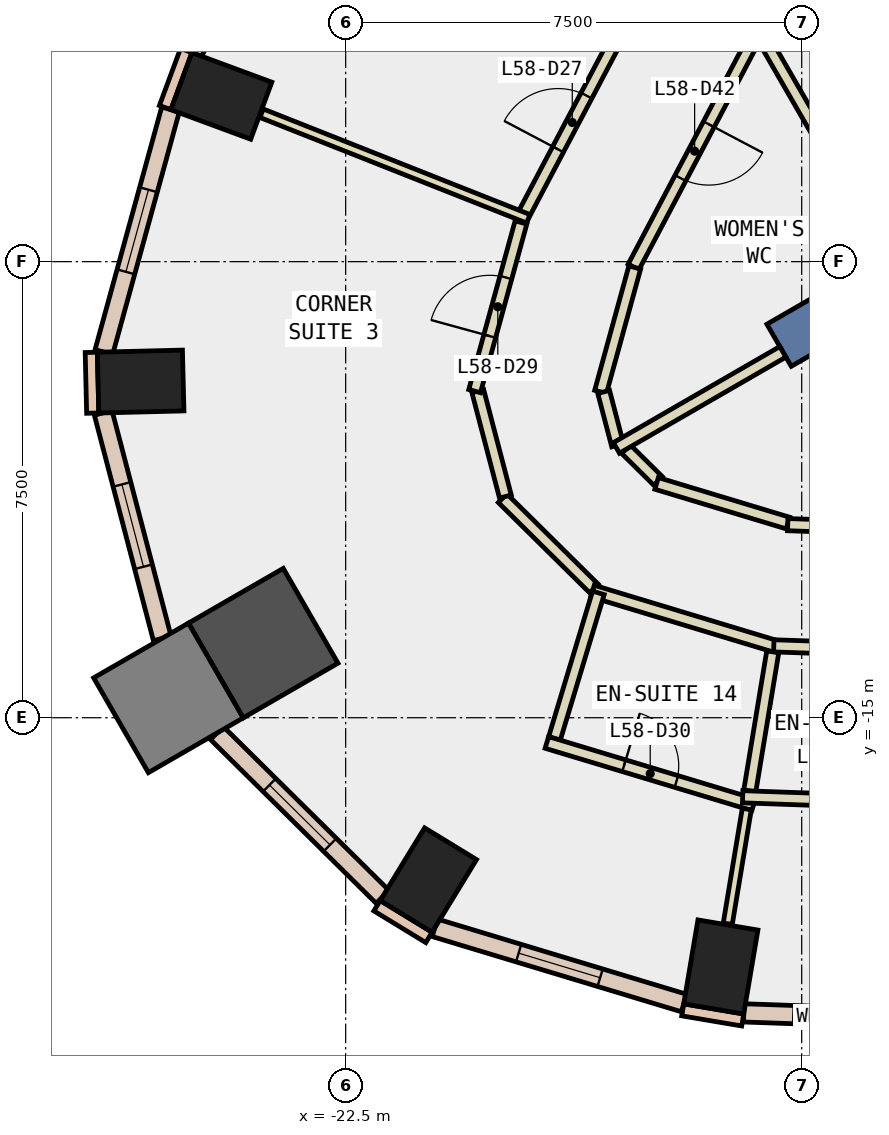
"""IFC4 building model, lengths in metres.
Left out: names, types, materials, properties, quantities, classifications, styles, units other than length and angle.
Written with IfcOpenShell. Run it as: python <this file> out.ifc"""

import sys

from ifc_helpers import new_model, si_unit, direction, frame, frame_2d, origin, origin_2d, place, context, subcontext, project, spatial, rectangle, extrude, element, fill, save


model = new_model("IFC4")
c1 = context("Model", 3, precision=1e-05, world=origin(), true_north=direction((0.0, 1.0)))
c2 = subcontext(c1, "Body", "Model", "MODEL_VIEW")
j1 = project(units=[si_unit("LENGTHUNIT", "METRE"), si_unit("PLANEANGLEUNIT", "RADIAN")], contexts=[c1])
p1 = place(None, origin())
s1 = spatial("IfcSite", under=j1, at=p1, CompositionType="ELEMENT")
p2 = place(p1, origin())
s2 = spatial("IfcBuilding", under=s1, at=p2, CompositionType="ELEMENT")
p3 = place(p2, frame((0.0, 0.0, 255.8)))
s3 = spatial("IfcBuildingStorey", under=s2, at=p3, CompositionType="ELEMENT", Elevation=255.8)
for number, where, z_axis, x_axis in (
    (1, (-16.33, -19.099, -0.34), (0.0, 0.0, 1.0), (-0.986, 0.167, 0.0)),
    (2, (-24.545, -4.775, -0.34), (0.0, 0.0, 1.0), (0.347, 0.938, 0.0)),
    (3, (-25.872, -9.472, -0.34), (0.0, 0.0, 1.0), (-0.025, 1.0, 0.0)),
):
    element("IfcColumn", number, at=place(p3, frame(where, z_axis=z_axis, x_axis=x_axis)), inside=s3, PredefinedType="COLUMN", context=c2, shape_type="SweptSolid", body=[
        extrude(rectangle(XDim=1.0, YDim=1.4, at=origin_2d()), origin(), (0.0, 0.0, 1.0), 3.6),
    ])
p4 = place(p3, frame((-23.856, -13.774, -0.34), z_axis=(0.0, 0.0, 1.0), x_axis=(0.866025403784, 0.5, 0.0)))
e4 = element("IfcColumn", 4, at=p4, inside=s3, PredefinedType="COLUMN", context=c2, shape_type="SweptSolid", body=[
    extrude(rectangle(XDim=1.8, YDim=1.8, at=origin_2d()), origin(), (0.0, 0.0, 1.0), 3.6),
])
p5 = place(p3, frame((-21.14, -17.67, -0.34), z_axis=(0.0, 0.0, 1.0), x_axis=(-0.853341581839, 0.521352227103, 0.0)))
e5 = element("IfcColumn", 5, at=p5, inside=s3, PredefinedType="COLUMN", context=c2, shape_type="SweptSolid", body=[
    extrude(rectangle(XDim=1.0, YDim=1.4, at=origin_2d()), origin(), (0.0, 0.0, 1.0), 3.6),
])
p6 = place(p3, frame((-25.415, -14.674, -0.34), z_axis=(0.0, 0.0, 1.0), x_axis=(0.866025403784, 0.5, 0.0)))
e6 = element("IfcColumn", 6, at=p6, inside=s3, PredefinedType="COLUMN", context=c2, shape_type="SweptSolid", body=[
    extrude(rectangle(XDim=1.8, YDim=1.8, at=origin_2d()), origin(), (0.0, 0.0, 1.0), 3.6),
])
p7 = place(p3, frame((-7.578, -4.375, -0.34), z_axis=(0.0, 0.0, 1.0), x_axis=(-0.866024315419, -0.5000018851, 0.0)))
e7 = element("IfcWall", 7, at=p7, inside=s3, PredefinedType="SHEAR", context=c2, shape_type="SweptSolid", body=[
    extrude(rectangle(XDim=9.0, YDim=0.8, at=frame_2d((4.5, 0.0))), origin(), (0.0, 0.0, 1.0), 3.6),
])
p8 = place(p3, frame((-25.122, -4.029, 0.0), z_axis=(0.0, 0.0, 1.0), x_axis=(-0.346892928577, -0.937904737222, 0.0)))
e8 = element("IfcWall", 8, at=p8, inside=s3, PredefinedType="STANDARD", context=c2, shape_type="SweptSolid", body=[
    extrude(rectangle(XDim=1.0, YDim=0.2, at=frame_2d((0.5, 0.0))), origin(), (0.0, 0.0, 1.0), 3.26),
])
p9 = place(p3, frame((-16.956, -19.804, 0.0), z_axis=(0.0, 0.0, 1.0), x_axis=(0.985961725342, -0.166971483074, 0.0)))
e9 = element("IfcWall", 9, at=p9, inside=s3, PredefinedType="STANDARD", context=c2, shape_type="SweptSolid", body=[
    extrude(rectangle(XDim=1.0, YDim=0.2, at=frame_2d((0.5, 0.0))), origin(), (0.0, 0.0, 1.0), 3.26),
])
p10 = place(p3, frame((-26.684, -8.992, 0.0), z_axis=(0.0, 0.0, 1.0), x_axis=(0.024186470916, -0.999707464524, 0.0)))
e10 = element("IfcWall", 10, at=p10, inside=s3, PredefinedType="STANDARD", context=c2, shape_type="SweptSolid", body=[
    extrude(rectangle(XDim=0.999, YDim=0.2, at=frame_2d((0.5, 0.0))), origin(), (0.0, 0.0, 1.0), 3.26),
])
p11 = place(p3, frame((-21.984, -18.092, 0.0), z_axis=(0.0, 0.0, 1.0), x_axis=(0.853679739553, -0.520798331677, 0.0)))
e11 = element("IfcWall", 11, at=p11, inside=s3, PredefinedType="STANDARD", context=c2, shape_type="SweptSolid", body=[
    extrude(rectangle(XDim=1.0, YDim=0.2, at=frame_2d((0.5, 0.0))), origin(), (0.0, 0.0, 1.0), 3.26),
])
p12 = place(p3, frame((-15.952, -19.854, 0.0), z_axis=(0.0, 0.0, 1.0), x_axis=(0.999387577449, -0.034992428331, 0.0)))
e12 = element("IfcWall", 12, at=p12, inside=s3, PredefinedType="STANDARD", context=c2, shape_type="SweptSolid", body=[
    extrude(rectangle(XDim=7.661, YDim=0.3, at=frame_2d((3.83, 0.0))), origin(), (0.0, 0.0, 1.0), 3.26),
])
p13 = place(p12, frame((0.815, 0.0, 0.9)))
e13 = element("IfcOpeningElement", 13, at=p13, cuts=e12, PredefinedType="OPENING", context=c2, shape_type="SweptSolid", body=[
    extrude(rectangle(XDim=2.2, YDim=2.0, at=frame_2d((1.1, 1.0))), frame((0.0, 0.16, 0.0), z_axis=(0.0, -1.0, 0.0), x_axis=(1.0, 0.0, 0.0)), (0.0, 0.0, 1.0), 0.32),
])
p14 = place(p12, frame((4.646, 0.0, 0.9)))
e14 = element("IfcOpeningElement", 14, at=p14, cuts=e12, PredefinedType="OPENING", context=c2, shape_type="SweptSolid", body=[
    extrude(rectangle(XDim=2.2, YDim=2.0, at=frame_2d((1.1, 1.0))), frame((0.0, 0.16, 0.0), z_axis=(0.0, -1.0, 0.0), x_axis=(1.0, 0.0, 0.0)), (0.0, 0.0, 1.0), 0.32),
])
p15 = place(p3, frame((-22.381, 0.916, 0.0), z_axis=(0.0, 0.0, 1.0), x_axis=(-0.466663589714, -0.884434900959, 0.0)))
e15 = element("IfcWall", 15, at=p15, inside=s3, PredefinedType="STANDARD", context=c2, shape_type="SweptSolid", body=[
    extrude(rectangle(XDim=5.638, YDim=0.3, at=frame_2d((2.819, 0.0))), origin(), (0.0, 0.0, 1.0), 3.26),
])
p16 = place(p15, frame((0.459, 0.0, 0.9)))
e16 = element("IfcOpeningElement", 16, at=p16, cuts=e15, PredefinedType="OPENING", context=c2, shape_type="SweptSolid", body=[
    extrude(rectangle(XDim=1.9, YDim=2.0, at=frame_2d((0.95, 1.0))), frame((0.0, 0.16, 0.0), z_axis=(0.0, -1.0, 0.0), x_axis=(1.0, 0.0, 0.0)), (0.0, 0.0, 1.0), 0.32),
])
p17 = place(p15, frame((3.278, 0.0, 0.9)))
e17 = element("IfcOpeningElement", 17, at=p17, cuts=e15, PredefinedType="OPENING", context=c2, shape_type="SweptSolid", body=[
    extrude(rectangle(XDim=1.9, YDim=2.0, at=frame_2d((0.95, 1.0))), frame((0.0, 0.16, 0.0), z_axis=(0.0, -1.0, 0.0), x_axis=(1.0, 0.0, 0.0)), (0.0, 0.0, 1.0), 0.32),
])
p18 = place(p3, frame((-25.381, -4.998, 0.0), z_axis=(0.0, 0.0, 1.0), x_axis=(-0.264924661919, -0.964269113633, 0.0)))
e18 = element("IfcWall", 18, at=p18, inside=s3, PredefinedType="STANDARD", context=c2, shape_type="SweptSolid", body=[
    extrude(rectangle(XDim=4.137, YDim=0.3, at=frame_2d((2.068, 0.0))), origin(), (0.0, 0.0, 1.0), 3.26),
])
p19 = place(p18, frame((1.368, 0.0, 0.9)))
e19 = element("IfcOpeningElement", 19, at=p19, cuts=e18, PredefinedType="OPENING", context=c2, shape_type="SweptSolid", body=[
    extrude(rectangle(XDim=1.4, YDim=2.0, at=frame_2d((0.7, 1.0))), frame((0.0, 0.16, 0.0), z_axis=(0.0, -1.0, 0.0), x_axis=(1.0, 0.0, 0.0)), (0.0, 0.0, 1.0), 0.32),
])
p20 = place(p3, frame((-26.488, -9.986, 0.0), z_axis=(0.0, 0.0, 1.0), x_axis=(0.253248721632, -0.967401201669, 0.0)))
e20 = element("IfcWall", 20, at=p20, inside=s3, PredefinedType="STANDARD", context=c2, shape_type="SweptSolid", body=[
    extrude(rectangle(XDim=3.834, YDim=0.3, at=frame_2d((1.917, 0.0))), origin(), (0.0, 0.0, 1.0), 3.26),
])
p21 = place(p20, frame((1.217, 0.0, 0.9)))
e21 = element("IfcOpeningElement", 21, at=p21, cuts=e20, PredefinedType="OPENING", context=c2, shape_type="SweptSolid", body=[
    extrude(rectangle(XDim=1.4, YDim=2.0, at=frame_2d((0.7, 1.0))), frame((0.0, 0.16, 0.0), z_axis=(0.0, -1.0, 0.0), x_axis=(1.0, 0.0, 0.0)), (0.0, 0.0, 1.0), 0.32),
])
p22 = place(p3, frame((-24.618, -15.252, 0.0), z_axis=(0.0, 0.0, 1.0), x_axis=(0.71110935557, -0.703081420904, 0.0)))
e22 = element("IfcWall", 22, at=p22, inside=s3, PredefinedType="STANDARD", context=c2, shape_type="SweptSolid", body=[
    extrude(rectangle(XDim=3.832, YDim=0.3, at=frame_2d((1.916, 0.0))), origin(), (0.0, 0.0, 1.0), 3.26),
])
p23 = place(p22, frame((1.216, 0.0, 0.9)))
e23 = element("IfcOpeningElement", 23, at=p23, cuts=e22, PredefinedType="OPENING", context=c2, shape_type="SweptSolid", body=[
    extrude(rectangle(XDim=1.4, YDim=2.0, at=frame_2d((0.7, 1.0))), frame((0.0, 0.16, 0.0), z_axis=(0.0, -1.0, 0.0), x_axis=(1.0, 0.0, 0.0)), (0.0, 0.0, 1.0), 0.32),
])
p24 = place(p3, frame((-21.034, -18.455, 0.0), z_axis=(0.0, 0.0, 1.0), x_axis=(0.957346168713, -0.288943442997, 0.0)))
e24 = element("IfcWall", 24, at=p24, inside=s3, PredefinedType="STANDARD", context=c2, shape_type="SweptSolid", body=[
    extrude(rectangle(XDim=4.281, YDim=0.3, at=frame_2d((2.14, 0.0))), origin(), (0.0, 0.0, 1.0), 3.26),
])
p25 = place(p24, frame((1.44, 0.0, 0.9)))
e25 = element("IfcOpeningElement", 25, at=p25, cuts=e24, PredefinedType="OPENING", context=c2, shape_type="SweptSolid", body=[
    extrude(rectangle(XDim=1.4, YDim=2.0, at=frame_2d((0.7, 1.0))), frame((0.0, 0.16, 0.0), z_axis=(0.0, -1.0, 0.0), x_axis=(1.0, 0.0, 0.0)), (0.0, 0.0, 1.0), 0.32),
])
p26 = place(p3, frame((-15.756, -3.779, 0.0), z_axis=(0.0, 0.0, 1.0), x_axis=(-0.46672043873, -0.884404902786, 0.0)))
e26 = element("IfcWall", 26, at=p26, inside=s3, PredefinedType="PARTITIONING", context=c2, shape_type="SweptSolid", body=[
    extrude(rectangle(XDim=4.307, YDim=0.2, at=frame_2d((2.153, 0.0))), origin(), (0.0, 0.0, 1.0), 3.26),
])
p27 = place(p26, frame((1.653, 0.0, 0.0)))
e27 = element("IfcOpeningElement", 27, at=p27, cuts=e26, PredefinedType="OPENING", context=c2, shape_type="SweptSolid", body=[
    extrude(rectangle(XDim=1.0, YDim=2.1, at=frame_2d((0.5, 1.05))), frame((0.0, 0.11, 0.0), z_axis=(0.0, -1.0, 0.0), x_axis=(1.0, 0.0, 0.0)), (0.0, 0.0, 1.0), 0.22),
])
p28 = place(p3, frame((-17.746, -7.596, 0.0), z_axis=(0.0, 0.0, 1.0), x_axis=(-0.264859637197, -0.96428697626, 0.0)))
e28 = element("IfcWall", 28, at=p28, inside=s3, PredefinedType="PARTITIONING", context=c2, shape_type="SweptSolid", body=[
    extrude(rectangle(XDim=2.122, YDim=0.2, at=frame_2d((1.061, 0.0))), origin(), (0.0, 0.0, 1.0), 3.26),
])
p29 = place(p3, frame((-18.257, -9.642, 0.0), z_axis=(0.0, 0.0, 1.0), x_axis=(0.253407342366, -0.967359663639, 0.0)))
e29 = element("IfcWall", 29, at=p29, inside=s3, PredefinedType="PARTITIONING", context=c2, shape_type="SweptSolid", body=[
    extrude(rectangle(XDim=0.907, YDim=0.2, at=frame_2d((0.454, 0.0))), origin(), (0.0, 0.0, 1.0), 3.26),
])
p30 = place(p3, frame((-17.89, -10.584, 0.0), z_axis=(0.0, 0.0, 1.0), x_axis=(0.711042348586, -0.70314918653, 0.0)))
e30 = element("IfcWall", 30, at=p30, inside=s3, PredefinedType="PARTITIONING", context=c2, shape_type="SweptSolid", body=[
    extrude(rectangle(XDim=0.742, YDim=0.2, at=frame_2d((0.371, 0.0))), origin(), (0.0, 0.0, 1.0), 3.26),
])
p31 = place(p3, frame((-17.386, -11.147, 0.0), z_axis=(0.0, 0.0, 1.0), x_axis=(0.957321496956, -0.289025174451, 0.0)))
e31 = element("IfcWall", 31, at=p31, inside=s3, PredefinedType="PARTITIONING", context=c2, shape_type="SweptSolid", body=[
    extrude(rectangle(XDim=2.256, YDim=0.2, at=frame_2d((1.128, 0.0))), origin(), (0.0, 0.0, 1.0), 3.26),
])
p32 = place(p3, frame((-15.23, -11.825, 0.0), z_axis=(0.0, 0.0, 1.0), x_axis=(0.999397560436, -0.0347061406, 0.0)))
e32 = element("IfcWall", 32, at=p32, inside=s3, PredefinedType="PARTITIONING", context=c2, shape_type="SweptSolid", body=[
    extrude(rectangle(XDim=4.207, YDim=0.2, at=frame_2d((2.103, 0.0))), origin(), (0.0, 0.0, 1.0), 3.26),
])
p33 = place(p32, frame((1.603, 0.0, 0.0)))
e33 = element("IfcOpeningElement", 33, at=p33, cuts=e32, PredefinedType="OPENING", context=c2, shape_type="SweptSolid", body=[
    extrude(rectangle(XDim=1.0, YDim=2.1, at=frame_2d((0.5, 1.05))), frame((0.0, 0.11, 0.0), z_axis=(0.0, -1.0, 0.0), x_axis=(1.0, 0.0, 0.0)), (0.0, 0.0, 1.0), 0.22),
])
p34 = place(p3, frame((-19.602, -6.781, 0.0), z_axis=(0.0, 0.0, 1.0), x_axis=(0.466827780692, 0.884348247679, 0.0)))
e34 = element("IfcWall", 34, at=p34, inside=s3, PredefinedType="PARTITIONING", context=c2, shape_type="SweptSolid", body=[
    extrude(rectangle(XDim=3.451, YDim=0.2, at=frame_2d((1.726, 0.0))), origin(), (0.0, 0.0, 1.0), 3.26),
])
p35 = place(p34, frame((1.275, 0.0, 0.0)))
e35 = element("IfcOpeningElement", 35, at=p35, cuts=e34, PredefinedType="OPENING", context=c2, shape_type="SweptSolid", body=[
    extrude(rectangle(XDim=1.0, YDim=2.1, at=frame_2d((0.5, 1.05))), frame((0.0, 0.11, 0.0), z_axis=(0.0, -1.0, 0.0), x_axis=(1.0, 0.0, 0.0)), (0.0, 0.0, 1.0), 0.22),
])
p36 = place(p3, frame((-18.415, -12.877, 0.0), z_axis=(0.0, 0.0, 1.0), x_axis=(-0.711078065077, 0.70311306727, 0.0)))
e36 = element("IfcWall", 36, at=p36, inside=s3, PredefinedType="PARTITIONING", context=c2, shape_type="SweptSolid", body=[
    extrude(rectangle(XDim=2.115, YDim=0.2, at=frame_2d((1.058, 0.0))), origin(), (0.0, 0.0, 1.0), 3.26),
])
p37 = place(p3, frame((-19.873, -11.363, 0.0), z_axis=(0.0, 0.0, 1.0), x_axis=(-0.253192482031, 0.967415922467, 0.0)))
e37 = element("IfcWall", 37, at=p37, inside=s3, PredefinedType="PARTITIONING", context=c2, shape_type="SweptSolid", body=[
    extrude(rectangle(XDim=1.792, YDim=0.2, at=frame_2d((0.896, 0.0))), origin(), (0.0, 0.0, 1.0), 3.26),
])
p38 = place(p3, frame((-20.379, -9.629, 0.0), z_axis=(0.0, 0.0, 1.0), x_axis=(0.26487636938, 0.964282380293, 0.0)))
e38 = element("IfcWall", 38, at=p38, inside=s3, PredefinedType="PARTITIONING", context=c2, shape_type="SweptSolid", body=[
    extrude(rectangle(XDim=2.877, YDim=0.2, at=frame_2d((1.438, 0.0))), origin(), (0.0, 0.0, 1.0), 3.26),
])
p39 = place(p38, frame((0.938, 0.0, 0.0)))
e39 = element("IfcOpeningElement", 39, at=p39, cuts=e38, PredefinedType="OPENING", context=c2, shape_type="SweptSolid", body=[
    extrude(rectangle(XDim=1.0, YDim=2.1, at=frame_2d((0.5, 1.05))), frame((0.0, 0.11, 0.0), z_axis=(0.0, -1.0, 0.0), x_axis=(1.0, 0.0, 0.0)), (0.0, 0.0, 1.0), 0.22),
])
p40 = place(p3, frame((-15.363, -13.847, 0.0), z_axis=(0.0, 0.0, 1.0), x_axis=(-0.957320969561, 0.289026921303, 0.0)))
e40 = element("IfcWall", 40, at=p40, inside=s3, PredefinedType="PARTITIONING", context=c2, shape_type="SweptSolid", body=[
    extrude(rectangle(XDim=3.214, YDim=0.2, at=frame_2d((1.607, 0.0))), origin(), (0.0, 0.0, 1.0), 3.26),
])
p41 = place(p3, frame((-12.961, -13.905, 0.0), z_axis=(0.0, 0.0, 1.0), x_axis=(-0.999395279268, 0.034771766949, 0.0)))
e41 = element("IfcWall", 41, at=p41, inside=s3, PredefinedType="PARTITIONING", context=c2, shape_type="SweptSolid", body=[
    extrude(rectangle(XDim=2.5, YDim=0.2, at=frame_2d((1.25, 0.0))), origin(), (0.0, 0.0, 1.0), 3.26),
])
p42 = place(p3, frame((-13.58, -7.379, 0.0), z_axis=(0.0, 0.0, 1.0), x_axis=(-0.499916403993, 0.866073662582, 0.0)))
e42 = element("IfcWall", 42, at=p42, inside=s3, PredefinedType="PARTITIONING", context=c2, shape_type="SweptSolid", body=[
    extrude(rectangle(XDim=4.359, YDim=0.2, at=frame_2d((2.179, 0.0))), origin(), (0.0, 0.0, 1.0), 3.26),
])
p43 = place(p3, frame((-15.31, -8.983, 0.0), z_axis=(0.0, 0.0, 1.0), x_axis=(-0.866047943894, -0.499960957353, 0.0)))
e43 = element("IfcWall", 43, at=p43, inside=s3, PredefinedType="PARTITIONING", context=c2, shape_type="SweptSolid", body=[
    extrude(rectangle(XDim=3.16, YDim=0.2, at=frame_2d((1.58, 0.0))), origin(), (0.0, 0.0, 1.0), 3.26),
])
p44 = place(p3, frame((-19.497, -6.795, 0.0), z_axis=(0.0, 0.0, 1.0), x_axis=(-0.929826906887, 0.367997178289, 0.0)))
e44 = element("IfcWall", 44, at=p44, inside=s3, PredefinedType="PARTITIONING", context=c2, shape_type="SweptSolid", body=[
    extrude(rectangle(XDim=4.717, YDim=0.15, at=frame_2d((2.358, 0.0))), origin(), (0.0, 0.0, 1.0), 3.26),
])
p45 = place(p3, frame((-18.344, -12.947, 0.0), z_axis=(0.0, 0.0, 1.0), x_axis=(-0.288709122303, -0.957416859419, 0.0)))
e45 = element("IfcWall", 45, at=p45, inside=s3, PredefinedType="PARTITIONING", context=c2, shape_type="SweptSolid", body=[
    extrude(rectangle(XDim=2.5, YDim=0.2, at=frame_2d((1.25, 0.0))), origin(), (0.0, 0.0, 1.0), 3.26),
])
p46 = place(p3, frame((-19.191, -15.407, 0.0), z_axis=(0.0, 0.0, 1.0), x_axis=(0.957443200759, -0.28862175476, 0.0)))
e46 = element("IfcWall", 46, at=p46, inside=s3, PredefinedType="PARTITIONING", context=c2, shape_type="SweptSolid", body=[
    extrude(rectangle(XDim=3.551, YDim=0.2, at=frame_2d((1.775, 0.0))), origin(), (0.0, 0.0, 1.0), 3.26),
])
p47 = place(p46, frame((1.325, 0.0, 0.0)))
e47 = element("IfcOpeningElement", 47, at=p47, cuts=e46, PredefinedType="OPENING", context=c2, shape_type="SweptSolid", body=[
    extrude(rectangle(XDim=0.9, YDim=2.1, at=frame_2d((0.45, 1.05))), frame((0.0, 0.11, 0.0), z_axis=(0.0, -1.0, 0.0), x_axis=(1.0, 0.0, 0.0)), (0.0, 0.0, 1.0), 0.22),
])
p48 = place(p3, frame((-15.903, -16.502, 0.0), z_axis=(0.0, 0.0, 1.0), x_axis=(-0.163715562906, -0.986507584594, 0.0)))
e48 = element("IfcWall", 48, at=p48, inside=s3, PredefinedType="PARTITIONING", context=c2, shape_type="SweptSolid", body=[
    extrude(rectangle(XDim=1.912, YDim=0.15, at=frame_2d((0.956, 0.0))), origin(), (0.0, 0.0, 1.0), 3.26),
])
p49 = place(p3, frame((-15.476, -13.917, 0.0), z_axis=(0.0, 0.0, 1.0), x_axis=(-0.162964805234, -0.986631882849, 0.0)))
e49 = element("IfcWall", 49, at=p49, inside=s3, PredefinedType="PARTITIONING", context=c2, shape_type="SweptSolid", body=[
    extrude(rectangle(XDim=2.319, YDim=0.2, at=frame_2d((1.16, 0.0))), origin(), (0.0, 0.0, 1.0), 3.26),
])
p50 = place(p3, frame((-15.971, -16.3, 0.0), z_axis=(0.0, 0.0, 1.0), x_axis=(0.999370791233, -0.035468600627, 0.0)))
e50 = element("IfcWall", 50, at=p50, inside=s3, PredefinedType="PARTITIONING", context=c2, shape_type="SweptSolid", body=[
    extrude(rectangle(XDim=3.125, YDim=0.2, at=frame_2d((1.562, 0.0))), origin(), (0.0, 0.0, 1.0), 3.26),
])
p51 = place(p50, frame((1.112, 0.0, 0.0)))
e51 = element("IfcOpeningElement", 51, at=p51, cuts=e50, PredefinedType="OPENING", context=c2, shape_type="SweptSolid", body=[
    extrude(rectangle(XDim=0.9, YDim=2.1, at=frame_2d((0.45, 1.05))), frame((0.0, 0.11, 0.0), z_axis=(0.0, -1.0, 0.0), x_axis=(1.0, 0.0, 0.0)), (0.0, 0.0, 1.0), 0.22),
])
p52 = place(p13, origin())
e52 = element("IfcWindow", 52, at=p52, inside=s3, PartitioningType="SINGLE_PANEL", PredefinedType="WINDOW", context=c2, shape_type="SweptSolid", body=[
    extrude(rectangle(XDim=2.2, YDim=2.0, at=frame_2d((1.1, 1.0))), frame((0.0, 0.03, 0.0), z_axis=(0.0, -1.0, 0.0), x_axis=(1.0, 0.0, 0.0)), (0.0, 0.0, 1.0), 0.06),
])
fill(e13, e52)
p53 = place(p19, origin())
e53 = element("IfcWindow", 53, at=p53, inside=s3, PartitioningType="SINGLE_PANEL", PredefinedType="WINDOW", context=c2, shape_type="SweptSolid", body=[
    extrude(rectangle(XDim=1.4, YDim=2.0, at=frame_2d((0.7, 1.0))), frame((0.0, 0.03, 0.0), z_axis=(0.0, -1.0, 0.0), x_axis=(1.0, 0.0, 0.0)), (0.0, 0.0, 1.0), 0.06),
])
fill(e19, e53)
p54 = place(p21, origin())
e54 = element("IfcWindow", 54, at=p54, inside=s3, PartitioningType="SINGLE_PANEL", PredefinedType="WINDOW", context=c2, shape_type="SweptSolid", body=[
    extrude(rectangle(XDim=1.4, YDim=2.0, at=frame_2d((0.7, 1.0))), frame((0.0, 0.03, 0.0), z_axis=(0.0, -1.0, 0.0), x_axis=(1.0, 0.0, 0.0)), (0.0, 0.0, 1.0), 0.06),
])
fill(e21, e54)
p55 = place(p23, origin())
e55 = element("IfcWindow", 55, at=p55, inside=s3, PartitioningType="SINGLE_PANEL", PredefinedType="WINDOW", context=c2, shape_type="SweptSolid", body=[
    extrude(rectangle(XDim=1.4, YDim=2.0, at=frame_2d((0.7, 1.0))), frame((0.0, 0.03, 0.0), z_axis=(0.0, -1.0, 0.0), x_axis=(1.0, 0.0, 0.0)), (0.0, 0.0, 1.0), 0.06),
])
fill(e23, e55)
p56 = place(p25, origin())
e56 = element("IfcWindow", 56, at=p56, inside=s3, PartitioningType="SINGLE_PANEL", PredefinedType="WINDOW", context=c2, shape_type="SweptSolid", body=[
    extrude(rectangle(XDim=1.4, YDim=2.0, at=frame_2d((0.7, 1.0))), frame((0.0, 0.03, 0.0), z_axis=(0.0, -1.0, 0.0), x_axis=(1.0, 0.0, 0.0)), (0.0, 0.0, 1.0), 0.06),
])
fill(e25, e56)
p57 = place(p35, origin())
e57 = element("IfcDoor", 57, at=p57, inside=s3, OperationType="SINGLE_SWING_LEFT", PredefinedType="DOOR", context=c2, shape_type="SweptSolid", body=[
    extrude(rectangle(XDim=1.0, YDim=2.1, at=frame_2d((0.5, 1.05))), frame((0.0, 0.025, 0.0), z_axis=(0.0, -1.0, 0.0), x_axis=(1.0, 0.0, 0.0)), (0.0, 0.0, 1.0), 0.05),
])
fill(e35, e57)
p58 = place(p39, origin())
e58 = element("IfcDoor", 58, at=p58, inside=s3, OperationType="SINGLE_SWING_LEFT", PredefinedType="DOOR", context=c2, shape_type="SweptSolid", body=[
    extrude(rectangle(XDim=1.0, YDim=2.1, at=frame_2d((0.5, 1.05))), frame((0.0, 0.025, 0.0), z_axis=(0.0, -1.0, 0.0), x_axis=(1.0, 0.0, 0.0)), (0.0, 0.0, 1.0), 0.05),
])
fill(e39, e58)
p59 = place(p47, origin())
e59 = element("IfcDoor", 59, at=p59, inside=s3, OperationType="SINGLE_SWING_LEFT", PredefinedType="DOOR", context=c2, shape_type="SweptSolid", body=[
    extrude(rectangle(XDim=0.9, YDim=2.1, at=frame_2d((0.45, 1.05))), frame((0.0, 0.025, 0.0), z_axis=(0.0, -1.0, 0.0), x_axis=(1.0, 0.0, 0.0)), (0.0, 0.0, 1.0), 0.05),
])
fill(e47, e59)
p60 = place(p27, origin())
e60 = element("IfcDoor", 60, at=p60, inside=s3, OperationType="SINGLE_SWING_LEFT", PredefinedType="DOOR", context=c2, shape_type="SweptSolid", body=[
    extrude(rectangle(XDim=1.0, YDim=2.1, at=frame_2d((0.5, 1.05))), frame((0.0, 0.025, 0.0), z_axis=(0.0, -1.0, 0.0), x_axis=(1.0, 0.0, 0.0)), (0.0, 0.0, 1.0), 0.05),
])
fill(e27, e60)
save(model, sys.argv[1])
